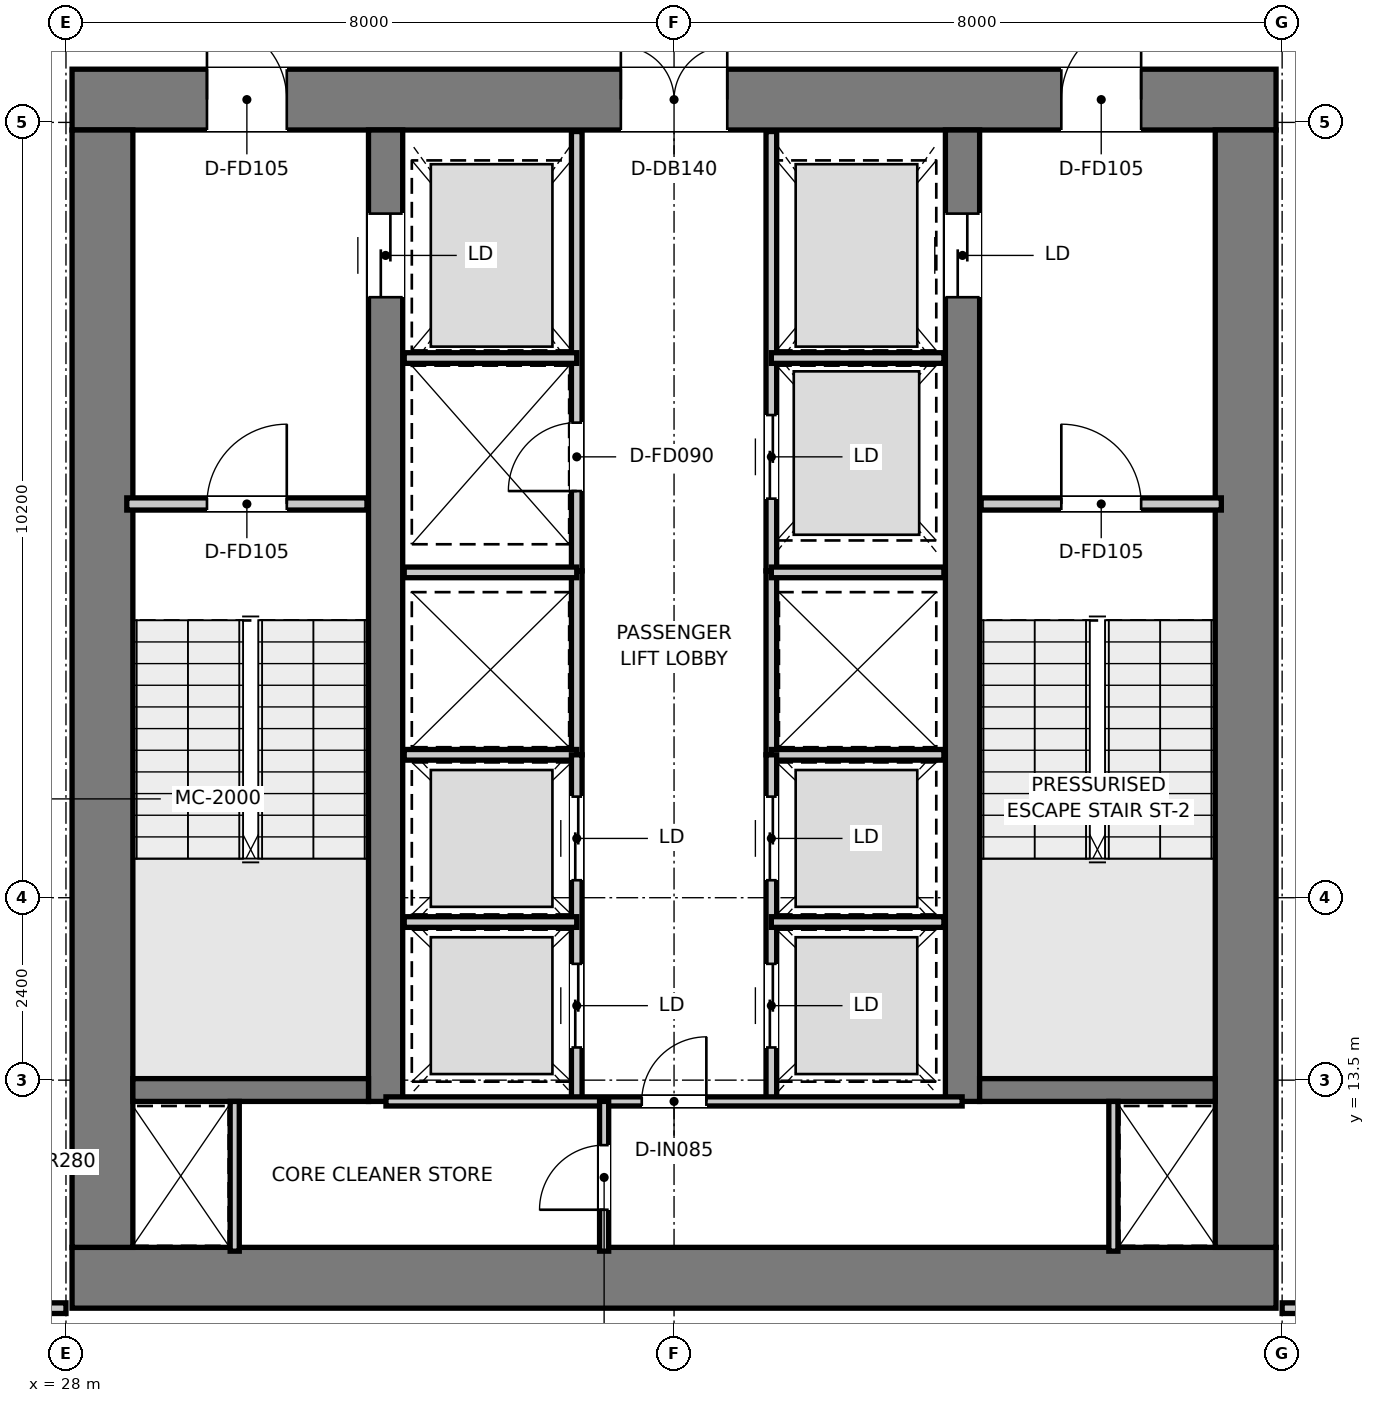
"""IFC4 building model, lengths in metres.
Left out: names, types, materials, properties, quantities, classifications, styles, units other than length and angle.
Written with IfcOpenShell. Run it as: python <this file> out.ifc"""

import sys

from ifc_helpers import new_model, si_unit, direction, frame, frame_2d, origin, place, context, subcontext, project, spatial, rectangle, extrude, element, fill, save


model = new_model("IFC4")
c1 = context("Model", 3, precision=1e-05, world=origin(), true_north=direction((0.0, 1.0)))
c2 = subcontext(c1, "Body", "Model", "MODEL_VIEW")
j1 = project(units=[si_unit("LENGTHUNIT", "METRE"), si_unit("PLANEANGLEUNIT", "RADIAN")], contexts=[c1])
p1 = place(None, origin())
s1 = spatial("IfcSite", under=j1, at=p1, CompositionType="ELEMENT")
p2 = place(p1, origin())
s2 = spatial("IfcBuilding", under=s1, at=p2, CompositionType="ELEMENT")
p3 = place(p2, frame((0.0, 0.0, 129.55)))
s3 = spatial("IfcBuildingStorey", under=s2, at=p3, CompositionType="ELEMENT", Elevation=129.55)
p4 = place(p3, frame((28.08, 10.9, 0.0), z_axis=(0.0, 0.0, 1.0), x_axis=(1.0, 0.0, 0.0)))
e1 = element("IfcWall", 1, at=p4, inside=s3, PredefinedType="SHEAR", context=c2, shape_type="SweptSolid", body=[
    extrude(rectangle(XDim=15.84, YDim=0.8, at=frame_2d((7.92, 0.0))), origin(), (0.0, 0.0, 1.0), 3.95),
])
p5 = place(p3, frame((28.08, 26.4, 0.0), z_axis=(0.0, 0.0, 1.0), x_axis=(1.0, 0.0, 0.0)))
e2 = element("IfcWall", 2, at=p5, inside=s3, PredefinedType="SHEAR", context=c2, shape_type="SweptSolid", body=[
    extrude(rectangle(XDim=15.84, YDim=0.8, at=frame_2d((7.92, 0.0))), origin(), (0.0, 0.0, 1.0), 3.95),
])
p6 = place(p5, frame((7.22, 0.0, 0.0)))
e3 = element("IfcOpeningElement", 3, at=p6, cuts=e2, PredefinedType="OPENING", context=c2, shape_type="SweptSolid", body=[
    extrude(rectangle(XDim=1.4, YDim=2.2, at=frame_2d((0.7, 1.1))), frame((0.0, 0.41, 0.0), z_axis=(0.0, -1.0, 0.0), x_axis=(1.0, 0.0, 0.0)), (0.0, 0.0, 1.0), 0.82),
])
p7 = place(p5, frame((1.775, 0.0, 0.0)))
e4 = element("IfcOpeningElement", 4, at=p7, cuts=e2, PredefinedType="OPENING", context=c2, shape_type="SweptSolid", body=[
    extrude(rectangle(XDim=1.05, YDim=2.1, at=frame_2d((0.525, 1.05))), frame((0.0, 0.41, 0.0), z_axis=(0.0, -1.0, 0.0), x_axis=(1.0, 0.0, 0.0)), (0.0, 0.0, 1.0), 0.82),
])
p8 = place(p5, frame((13.015, 0.0, 0.0)))
e5 = element("IfcOpeningElement", 5, at=p8, cuts=e2, PredefinedType="OPENING", context=c2, shape_type="SweptSolid", body=[
    extrude(rectangle(XDim=1.05, YDim=2.1, at=frame_2d((0.525, 1.05))), frame((0.0, 0.41, 0.0), z_axis=(0.0, -1.0, 0.0), x_axis=(1.0, 0.0, 0.0)), (0.0, 0.0, 1.0), 0.82),
])
for number, where, z_axis, x_axis in (
    (6, (28.48, 11.3, 0.0), (0.0, 0.0, 1.0), (0.0, 1.0, 0.0)),
    (7, (43.52, 11.3, 0.0), (0.0, 0.0, 1.0), (0.0, 1.0, 0.0)),
):
    element("IfcWall", number, at=place(p3, frame(where, z_axis=z_axis, x_axis=x_axis)), inside=s3, PredefinedType="SHEAR", context=c2, shape_type="SweptSolid", body=[
        extrude(rectangle(XDim=14.7, YDim=0.8, at=frame_2d((7.35, 0.0))), origin(), (0.0, 0.0, 1.0), 3.95),
    ])
p9 = place(p3, frame((32.205, 13.22, 0.0), z_axis=(0.0, 0.0, 1.0), x_axis=(0.0, 1.0, 0.0)))
e8 = element("IfcWall", 8, at=p9, inside=s3, PredefinedType="SHEAR", context=c2, shape_type="SweptSolid", body=[
    extrude(rectangle(XDim=12.78, YDim=0.45, at=frame_2d((6.39, 0.0))), origin(), (0.0, 0.0, 1.0), 3.95),
])
p10 = place(p9, frame((10.58, 0.0, 0.0)))
e9 = element("IfcOpeningElement", 9, at=p10, cuts=e8, PredefinedType="OPENING", context=c2, shape_type="SweptSolid", body=[
    extrude(rectangle(XDim=1.1, YDim=2.15, at=frame_2d((0.55, 1.075))), frame((0.0, 0.235, 0.0), z_axis=(0.0, -1.0, 0.0), x_axis=(1.0, 0.0, 0.0)), (0.0, 0.0, 1.0), 0.47),
])
p11 = place(p3, frame((39.795, 13.22, 0.0), z_axis=(0.0, 0.0, 1.0), x_axis=(0.0, 1.0, 0.0)))
e10 = element("IfcWall", 10, at=p11, inside=s3, PredefinedType="SHEAR", context=c2, shape_type="SweptSolid", body=[
    extrude(rectangle(XDim=12.78, YDim=0.45, at=frame_2d((6.39, 0.0))), origin(), (0.0, 0.0, 1.0), 3.95),
])
p12 = place(p11, frame((10.58, 0.0, 0.0)))
e11 = element("IfcOpeningElement", 11, at=p12, cuts=e10, PredefinedType="OPENING", context=c2, shape_type="SweptSolid", body=[
    extrude(rectangle(XDim=1.1, YDim=2.15, at=frame_2d((0.55, 1.075))), frame((0.0, 0.235, 0.0), z_axis=(0.0, -1.0, 0.0), x_axis=(1.0, 0.0, 0.0)), (0.0, 0.0, 1.0), 0.47),
])
for number, where, z_axis, x_axis in (
    (12, (28.88, 13.37, 0.0), (0.0, 0.0, 1.0), (1.0, 0.0, 0.0)),
    (13, (40.02, 13.37, 0.0), (0.0, 0.0, 1.0), (1.0, 0.0, 0.0)),
):
    element("IfcWall", number, at=place(p3, frame(where, z_axis=z_axis, x_axis=x_axis)), inside=s3, PredefinedType="SHEAR", context=c2, shape_type="SweptSolid", body=[
        extrude(rectangle(XDim=3.1, YDim=0.3, at=frame_2d((1.55, 0.0))), origin(), (0.0, 0.0, 1.0), 3.95),
    ])
p13 = place(p3, frame((28.8, 21.08, 0.0), z_axis=(0.0, 0.0, 1.0), x_axis=(1.0, 0.0, 0.0)))
e14 = element("IfcWall", 14, at=p13, inside=s3, PredefinedType="PARTITIONING", context=c2, shape_type="SweptSolid", body=[
    extrude(rectangle(XDim=3.16, YDim=0.16, at=frame_2d((1.58, 0.0))), origin(), (0.0, 0.0, 1.0), 3.67),
])
p14 = place(p13, frame((1.055, 0.0, 0.0)))
e15 = element("IfcOpeningElement", 15, at=p14, cuts=e14, PredefinedType="OPENING", context=c2, shape_type="SweptSolid", body=[
    extrude(rectangle(XDim=1.05, YDim=2.1, at=frame_2d((0.525, 1.05))), frame((0.0, 0.09, 0.0), z_axis=(0.0, -1.0, 0.0), x_axis=(1.0, 0.0, 0.0)), (0.0, 0.0, 1.0), 0.18),
])
p15 = place(p3, frame((40.04, 21.08, 0.0), z_axis=(0.0, 0.0, 1.0), x_axis=(1.0, 0.0, 0.0)))
e16 = element("IfcWall", 16, at=p15, inside=s3, PredefinedType="PARTITIONING", context=c2, shape_type="SweptSolid", body=[
    extrude(rectangle(XDim=3.16, YDim=0.16, at=frame_2d((1.58, 0.0))), origin(), (0.0, 0.0, 1.0), 3.67),
])
p16 = place(p15, frame((1.055, 0.0, 0.0)))
e17 = element("IfcOpeningElement", 17, at=p16, cuts=e16, PredefinedType="OPENING", context=c2, shape_type="SweptSolid", body=[
    extrude(rectangle(XDim=1.05, YDim=2.1, at=frame_2d((0.525, 1.05))), frame((0.0, 0.09, 0.0), z_axis=(0.0, -1.0, 0.0), x_axis=(1.0, 0.0, 0.0)), (0.0, 0.0, 1.0), 0.18),
])
p17 = place(p3, frame((34.72, 20.2, 0.0), z_axis=(0.0, 0.0, 1.0), x_axis=(0.0, 1.0, 0.0)))
e18 = element("IfcWall", 18, at=p17, inside=s3, PredefinedType="PARTITIONING", context=c2, shape_type="SweptSolid", body=[
    extrude(rectangle(XDim=5.78, YDim=0.14, at=frame_2d((2.89, 0.0))), origin(), (0.0, 0.0, 1.0), 2.67),
])
p18 = place(p17, frame((1.05, 0.0, 0.0)))
e19 = element("IfcOpeningElement", 19, at=p18, cuts=e18, PredefinedType="OPENING", context=c2, shape_type="SweptSolid", body=[
    extrude(rectangle(XDim=0.9, YDim=2.1, at=frame_2d((0.45, 1.05))), frame((0.0, 0.08, 0.0), z_axis=(0.0, -1.0, 0.0), x_axis=(1.0, 0.0, 0.0)), (0.0, 0.0, 1.0), 0.16),
])
p19 = place(p3, frame((37.28, 20.2, 0.0), z_axis=(0.0, 0.0, 1.0), x_axis=(0.0, 1.0, 0.0)))
e20 = element("IfcWall", 20, at=p19, inside=s3, PredefinedType="PARTITIONING", context=c2, shape_type="SweptSolid", body=[
    extrude(rectangle(XDim=5.78, YDim=0.14, at=frame_2d((2.89, 0.0))), origin(), (0.0, 0.0, 1.0), 2.67),
])
p20 = place(p19, frame((0.95, 0.0, 0.0)))
e21 = element("IfcOpeningElement", 21, at=p20, cuts=e20, PredefinedType="OPENING", context=c2, shape_type="SweptSolid", body=[
    extrude(rectangle(XDim=1.1, YDim=2.15, at=frame_2d((0.55, 1.075))), frame((0.0, 0.08, 0.0), z_axis=(0.0, -1.0, 0.0), x_axis=(1.0, 0.0, 0.0)), (0.0, 0.0, 1.0), 0.16),
])
for number, where, z_axis, x_axis in (
    (22, (32.45, 23.0, 0.0), (0.0, 0.0, 1.0), (1.0, 0.0, 0.0)),
    (23, (37.28, 23.0, 0.0), (0.0, 0.0, 1.0), (1.0, 0.0, 0.0)),
):
    element("IfcWall", number, at=place(p3, frame(where, z_axis=z_axis, x_axis=x_axis)), inside=s3, PredefinedType="PARTITIONING", context=c2, shape_type="SweptSolid", body=[
        extrude(rectangle(XDim=2.27, YDim=0.14, at=frame_2d((1.135, 0.0))), origin(), (0.0, 0.0, 1.0), 2.67),
    ])
for number, where, z_axis, x_axis in (
    (24, (34.72, 17.78, 0.0), (0.0, 0.0, 1.0), (0.0, 1.0, 0.0)),
    (25, (37.28, 17.78, 0.0), (0.0, 0.0, 1.0), (0.0, 1.0, 0.0)),
):
    element("IfcWall", number, at=place(p3, frame(where, z_axis=z_axis, x_axis=x_axis)), inside=s3, PredefinedType="PARTITIONING", context=c2, shape_type="SweptSolid", body=[
        extrude(rectangle(XDim=2.42, YDim=0.14, at=frame_2d((1.21, 0.0))), origin(), (0.0, 0.0, 1.0), 3.67),
    ])
for number, where, z_axis, x_axis in (
    (26, (32.45, 17.78, 0.0), (0.0, 0.0, 1.0), (1.0, 0.0, 0.0)),
    (27, (32.45, 20.18, 0.0), (0.0, 0.0, 1.0), (1.0, 0.0, 0.0)),
    (28, (37.28, 17.78, 0.0), (0.0, 0.0, 1.0), (1.0, 0.0, 0.0)),
    (29, (37.28, 20.18, 0.0), (0.0, 0.0, 1.0), (1.0, 0.0, 0.0)),
):
    element("IfcWall", number, at=place(p3, frame(where, z_axis=z_axis, x_axis=x_axis)), inside=s3, PredefinedType="PARTITIONING", context=c2, shape_type="SweptSolid", body=[
        extrude(rectangle(XDim=2.27, YDim=0.14, at=frame_2d((1.135, 0.0))), origin(), (0.0, 0.0, 1.0), 3.67),
    ])
p21 = place(p3, frame((34.72, 13.22, 0.0), z_axis=(0.0, 0.0, 1.0), x_axis=(0.0, 1.0, 0.0)))
e30 = element("IfcWall", 30, at=p21, inside=s3, PredefinedType="PARTITIONING", context=c2, shape_type="SweptSolid", body=[
    extrude(rectangle(XDim=4.56, YDim=0.14, at=frame_2d((2.28, 0.0))), origin(), (0.0, 0.0, 1.0), 3.67),
])
p22 = place(p21, frame((0.71, 0.0, 0.0)))
e31 = element("IfcOpeningElement", 31, at=p22, cuts=e30, PredefinedType="OPENING", context=c2, shape_type="SweptSolid", body=[
    extrude(rectangle(XDim=1.1, YDim=2.15, at=frame_2d((0.55, 1.075))), frame((0.0, 0.08, 0.0), z_axis=(0.0, -1.0, 0.0), x_axis=(1.0, 0.0, 0.0)), (0.0, 0.0, 1.0), 0.16),
])
p23 = place(p21, frame((2.91, 0.0, 0.0)))
e32 = element("IfcOpeningElement", 32, at=p23, cuts=e30, PredefinedType="OPENING", context=c2, shape_type="SweptSolid", body=[
    extrude(rectangle(XDim=1.1, YDim=2.15, at=frame_2d((0.55, 1.075))), frame((0.0, 0.08, 0.0), z_axis=(0.0, -1.0, 0.0), x_axis=(1.0, 0.0, 0.0)), (0.0, 0.0, 1.0), 0.16),
])
p24 = place(p3, frame((32.45, 15.58, 0.0), z_axis=(0.0, 0.0, 1.0), x_axis=(1.0, 0.0, 0.0)))
e33 = element("IfcWall", 33, at=p24, inside=s3, PredefinedType="PARTITIONING", context=c2, shape_type="SweptSolid", body=[
    extrude(rectangle(XDim=2.27, YDim=0.14, at=frame_2d((1.135, 0.0))), origin(), (0.0, 0.0, 1.0), 3.67),
])
p25 = place(p3, frame((37.28, 13.22, 0.0), z_axis=(0.0, 0.0, 1.0), x_axis=(0.0, 1.0, 0.0)))
e34 = element("IfcWall", 34, at=p25, inside=s3, PredefinedType="PARTITIONING", context=c2, shape_type="SweptSolid", body=[
    extrude(rectangle(XDim=4.56, YDim=0.14, at=frame_2d((2.28, 0.0))), origin(), (0.0, 0.0, 1.0), 3.67),
])
p26 = place(p25, frame((0.71, 0.0, 0.0)))
e35 = element("IfcOpeningElement", 35, at=p26, cuts=e34, PredefinedType="OPENING", context=c2, shape_type="SweptSolid", body=[
    extrude(rectangle(XDim=1.1, YDim=2.15, at=frame_2d((0.55, 1.075))), frame((0.0, 0.08, 0.0), z_axis=(0.0, -1.0, 0.0), x_axis=(1.0, 0.0, 0.0)), (0.0, 0.0, 1.0), 0.16),
])
p27 = place(p25, frame((2.91, 0.0, 0.0)))
e36 = element("IfcOpeningElement", 36, at=p27, cuts=e34, PredefinedType="OPENING", context=c2, shape_type="SweptSolid", body=[
    extrude(rectangle(XDim=1.1, YDim=2.15, at=frame_2d((0.55, 1.075))), frame((0.0, 0.08, 0.0), z_axis=(0.0, -1.0, 0.0), x_axis=(1.0, 0.0, 0.0)), (0.0, 0.0, 1.0), 0.16),
])
p28 = place(p3, frame((37.28, 15.58, 0.0), z_axis=(0.0, 0.0, 1.0), x_axis=(1.0, 0.0, 0.0)))
e37 = element("IfcWall", 37, at=p28, inside=s3, PredefinedType="PARTITIONING", context=c2, shape_type="SweptSolid", body=[
    extrude(rectangle(XDim=2.27, YDim=0.14, at=frame_2d((1.135, 0.0))), origin(), (0.0, 0.0, 1.0), 3.67),
])
for number, where, z_axis, x_axis in (
    (38, (30.22, 11.25, 0.0), (0.0, 0.0, 1.0), (0.0, 1.0, 0.0)),
    (39, (41.78, 11.25, 0.0), (0.0, 0.0, 1.0), (0.0, 1.0, 0.0)),
):
    element("IfcWall", number, at=place(p3, frame(where, z_axis=z_axis, x_axis=x_axis)), inside=s3, PredefinedType="PARTITIONING", context=c2, shape_type="SweptSolid", body=[
        extrude(rectangle(XDim=1.97, YDim=0.12, at=frame_2d((0.985, 0.0))), origin(), (0.0, 0.0, 1.0), 3.67),
    ])
p29 = place(p3, frame((32.21, 13.22, 0.0), z_axis=(0.0, 0.0, 1.0), x_axis=(1.0, 0.0, 0.0)))
e40 = element("IfcWall", 40, at=p29, inside=s3, PredefinedType="PARTITIONING", context=c2, shape_type="SweptSolid", body=[
    extrude(rectangle(XDim=7.58, YDim=0.12, at=frame_2d((3.79, 0.0))), origin(), (0.0, 0.0, 1.0), 3.67),
])
p30 = place(p29, frame((3.365, 0.0, 0.0)))
e41 = element("IfcOpeningElement", 41, at=p30, cuts=e40, PredefinedType="OPENING", context=c2, shape_type="SweptSolid", body=[
    extrude(rectangle(XDim=0.85, YDim=2.1, at=frame_2d((0.425, 1.05))), frame((0.0, 0.07, 0.0), z_axis=(0.0, -1.0, 0.0), x_axis=(1.0, 0.0, 0.0)), (0.0, 0.0, 1.0), 0.14),
])
p31 = place(p3, frame((35.08, 11.25, 0.0), z_axis=(0.0, 0.0, 1.0), x_axis=(0.0, 1.0, 0.0)))
e42 = element("IfcWall", 42, at=p31, inside=s3, PredefinedType="PARTITIONING", context=c2, shape_type="SweptSolid", body=[
    extrude(rectangle(XDim=1.97, YDim=0.12, at=frame_2d((0.985, 0.0))), origin(), (0.0, 0.0, 1.0), 3.67),
])
p32 = place(p31, frame((0.545, 0.0, 0.0)))
e43 = element("IfcOpeningElement", 43, at=p32, cuts=e42, PredefinedType="OPENING", context=c2, shape_type="SweptSolid", body=[
    extrude(rectangle(XDim=0.85, YDim=2.1, at=frame_2d((0.425, 1.05))), frame((0.0, 0.07, 0.0), z_axis=(0.0, -1.0, 0.0), x_axis=(1.0, 0.0, 0.0)), (0.0, 0.0, 1.0), 0.14),
])
p33 = place(p3, frame((26.32, 10.5, 0.0), z_axis=(0.0, 0.0, 1.0), x_axis=(1.0, 0.0, 0.0)))
e44 = element("IfcWall", 44, at=p33, inside=s3, PredefinedType="PARTITIONING", context=c2, shape_type="SweptSolid", body=[
    extrude(rectangle(XDim=1.68, YDim=0.14, at=frame_2d((0.84, 0.0))), origin(), (0.0, 0.0, 1.0), 3.67),
])
p34 = place(p33, frame((0.445, 0.0, 0.0)))
e45 = element("IfcOpeningElement", 45, at=p34, cuts=e44, PredefinedType="OPENING", context=c2, shape_type="SweptSolid", body=[
    extrude(rectangle(XDim=0.85, YDim=2.1, at=frame_2d((0.425, 1.05))), frame((0.0, 0.08, 0.0), z_axis=(0.0, -1.0, 0.0), x_axis=(1.0, 0.0, 0.0)), (0.0, 0.0, 1.0), 0.16),
])
p35 = place(p3, frame((44.0, 10.5, 0.0), z_axis=(0.0, 0.0, 1.0), x_axis=(1.0, 0.0, 0.0)))
e46 = element("IfcWall", 46, at=p35, inside=s3, PredefinedType="PARTITIONING", context=c2, shape_type="SweptSolid", body=[
    extrude(rectangle(XDim=1.68, YDim=0.14, at=frame_2d((0.84, 0.0))), origin(), (0.0, 0.0, 1.0), 3.67),
])
p36 = place(p14, origin())
e47 = element("IfcDoor", 47, at=p36, inside=s3, OperationType="SINGLE_SWING_RIGHT", PredefinedType="DOOR", context=c2, shape_type="SweptSolid", body=[
    extrude(rectangle(XDim=1.05, YDim=2.1, at=frame_2d((0.525, 1.05))), frame((0.0, 0.025, 0.0), z_axis=(0.0, -1.0, 0.0), x_axis=(1.0, 0.0, 0.0)), (0.0, 0.0, 1.0), 0.05),
])
fill(e15, e47)
p37 = place(p16, origin())
e48 = element("IfcDoor", 48, at=p37, inside=s3, OperationType="SINGLE_SWING_LEFT", PredefinedType="DOOR", context=c2, shape_type="SweptSolid", body=[
    extrude(rectangle(XDim=1.05, YDim=2.1, at=frame_2d((0.525, 1.05))), frame((0.0, 0.025, 0.0), z_axis=(0.0, -1.0, 0.0), x_axis=(1.0, 0.0, 0.0)), (0.0, 0.0, 1.0), 0.05),
])
fill(e17, e48)
p38 = place(p6, origin())
e49 = element("IfcDoor", 49, at=p38, inside=s3, OperationType="DOUBLE_DOOR_SINGLE_SWING", PredefinedType="DOOR", context=c2, shape_type="SweptSolid", body=[
    extrude(rectangle(XDim=1.4, YDim=2.2, at=frame_2d((0.7, 1.1))), frame((0.0, 0.025, 0.0), z_axis=(0.0, -1.0, 0.0), x_axis=(1.0, 0.0, 0.0)), (0.0, 0.0, 1.0), 0.05),
])
fill(e3, e49)
p39 = place(p7, origin())
e50 = element("IfcDoor", 50, at=p39, inside=s3, OperationType="SINGLE_SWING_LEFT", PredefinedType="DOOR", context=c2, shape_type="SweptSolid", body=[
    extrude(rectangle(XDim=1.05, YDim=2.1, at=frame_2d((0.525, 1.05))), frame((0.0, 0.025, 0.0), z_axis=(0.0, -1.0, 0.0), x_axis=(1.0, 0.0, 0.0)), (0.0, 0.0, 1.0), 0.05),
])
fill(e4, e50)
p40 = place(p8, origin())
e51 = element("IfcDoor", 51, at=p40, inside=s3, OperationType="SINGLE_SWING_RIGHT", PredefinedType="DOOR", context=c2, shape_type="SweptSolid", body=[
    extrude(rectangle(XDim=1.05, YDim=2.1, at=frame_2d((0.525, 1.05))), frame((0.0, 0.025, 0.0), z_axis=(0.0, -1.0, 0.0), x_axis=(1.0, 0.0, 0.0)), (0.0, 0.0, 1.0), 0.05),
])
fill(e5, e51)
p41 = place(p10, origin())
e52 = element("IfcDoor", 52, at=p41, inside=s3, OperationType="DOUBLE_DOOR_SLIDING", PredefinedType="DOOR", context=c2, shape_type="SweptSolid", body=[
    extrude(rectangle(XDim=1.1, YDim=2.15, at=frame_2d((0.55, 1.075))), frame((0.0, 0.025, 0.0), z_axis=(0.0, -1.0, 0.0), x_axis=(1.0, 0.0, 0.0)), (0.0, 0.0, 1.0), 0.05),
])
fill(e9, e52)
p42 = place(p12, origin())
e53 = element("IfcDoor", 53, at=p42, inside=s3, OperationType="DOUBLE_DOOR_SLIDING", PredefinedType="DOOR", context=c2, shape_type="SweptSolid", body=[
    extrude(rectangle(XDim=1.1, YDim=2.15, at=frame_2d((0.55, 1.075))), frame((0.0, 0.025, 0.0), z_axis=(0.0, -1.0, 0.0), x_axis=(1.0, 0.0, 0.0)), (0.0, 0.0, 1.0), 0.05),
])
fill(e11, e53)
p43 = place(p18, origin())
e54 = element("IfcDoor", 54, at=p43, inside=s3, OperationType="SINGLE_SWING_LEFT", PredefinedType="DOOR", context=c2, shape_type="SweptSolid", body=[
    extrude(rectangle(XDim=0.9, YDim=2.1, at=frame_2d((0.45, 1.05))), frame((0.0, 0.025, 0.0), z_axis=(0.0, -1.0, 0.0), x_axis=(1.0, 0.0, 0.0)), (0.0, 0.0, 1.0), 0.05),
])
fill(e19, e54)
p44 = place(p20, origin())
e55 = element("IfcDoor", 55, at=p44, inside=s3, OperationType="DOUBLE_DOOR_SLIDING", PredefinedType="DOOR", context=c2, shape_type="SweptSolid", body=[
    extrude(rectangle(XDim=1.1, YDim=2.15, at=frame_2d((0.55, 1.075))), frame((0.0, 0.025, 0.0), z_axis=(0.0, -1.0, 0.0), x_axis=(1.0, 0.0, 0.0)), (0.0, 0.0, 1.0), 0.05),
])
fill(e21, e55)
p45 = place(p22, origin())
e56 = element("IfcDoor", 56, at=p45, inside=s3, OperationType="DOUBLE_DOOR_SLIDING", PredefinedType="DOOR", context=c2, shape_type="SweptSolid", body=[
    extrude(rectangle(XDim=1.1, YDim=2.15, at=frame_2d((0.55, 1.075))), frame((0.0, 0.025, 0.0), z_axis=(0.0, -1.0, 0.0), x_axis=(1.0, 0.0, 0.0)), (0.0, 0.0, 1.0), 0.05),
])
fill(e31, e56)
p46 = place(p23, origin())
e57 = element("IfcDoor", 57, at=p46, inside=s3, OperationType="DOUBLE_DOOR_SLIDING", PredefinedType="DOOR", context=c2, shape_type="SweptSolid", body=[
    extrude(rectangle(XDim=1.1, YDim=2.15, at=frame_2d((0.55, 1.075))), frame((0.0, 0.025, 0.0), z_axis=(0.0, -1.0, 0.0), x_axis=(1.0, 0.0, 0.0)), (0.0, 0.0, 1.0), 0.05),
])
fill(e32, e57)
p47 = place(p26, origin())
e58 = element("IfcDoor", 58, at=p47, inside=s3, OperationType="DOUBLE_DOOR_SLIDING", PredefinedType="DOOR", context=c2, shape_type="SweptSolid", body=[
    extrude(rectangle(XDim=1.1, YDim=2.15, at=frame_2d((0.55, 1.075))), frame((0.0, 0.025, 0.0), z_axis=(0.0, -1.0, 0.0), x_axis=(1.0, 0.0, 0.0)), (0.0, 0.0, 1.0), 0.05),
])
fill(e35, e58)
p48 = place(p27, origin())
e59 = element("IfcDoor", 59, at=p48, inside=s3, OperationType="DOUBLE_DOOR_SLIDING", PredefinedType="DOOR", context=c2, shape_type="SweptSolid", body=[
    extrude(rectangle(XDim=1.1, YDim=2.15, at=frame_2d((0.55, 1.075))), frame((0.0, 0.025, 0.0), z_axis=(0.0, -1.0, 0.0), x_axis=(1.0, 0.0, 0.0)), (0.0, 0.0, 1.0), 0.05),
])
fill(e36, e59)
p49 = place(p30, origin())
e60 = element("IfcDoor", 60, at=p49, inside=s3, OperationType="SINGLE_SWING_RIGHT", PredefinedType="DOOR", context=c2, shape_type="SweptSolid", body=[
    extrude(rectangle(XDim=0.85, YDim=2.1, at=frame_2d((0.425, 1.05))), frame((0.0, 0.025, 0.0), z_axis=(0.0, -1.0, 0.0), x_axis=(1.0, 0.0, 0.0)), (0.0, 0.0, 1.0), 0.05),
])
fill(e41, e60)
p50 = place(p32, origin())
e61 = element("IfcDoor", 61, at=p50, inside=s3, OperationType="SINGLE_SWING_LEFT", PredefinedType="DOOR", context=c2, shape_type="SweptSolid", body=[
    extrude(rectangle(XDim=0.85, YDim=2.1, at=frame_2d((0.425, 1.05))), frame((0.0, 0.025, 0.0), z_axis=(0.0, -1.0, 0.0), x_axis=(1.0, 0.0, 0.0)), (0.0, 0.0, 1.0), 0.05),
])
fill(e43, e61)
save(model, sys.argv[1])
